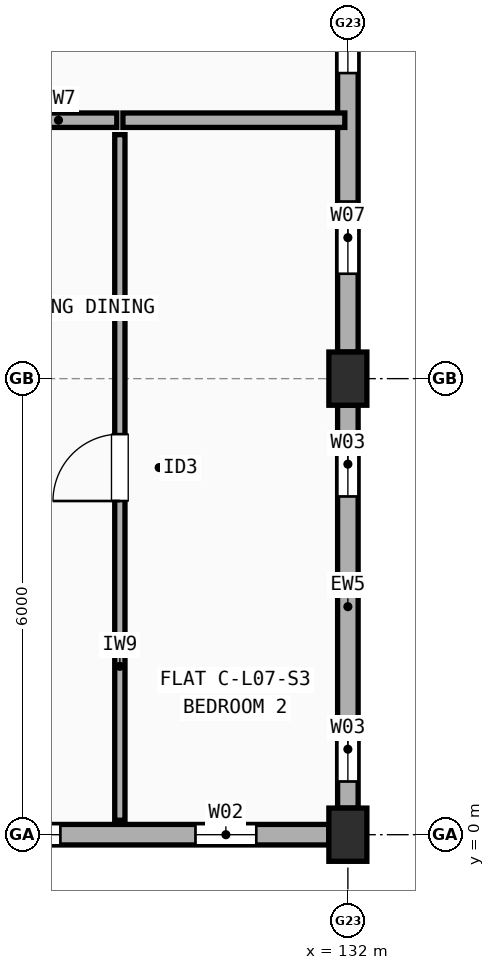
"""IFC4 building model, lengths in metres.
Left out: names, types, materials, properties, quantities, classifications, styles, units other than length and angle.
Written with IfcOpenShell. Run it as: python <this file> out.ifc"""

import sys

from ifc_helpers import new_model, si_unit, direction, frame, frame_2d, origin, origin_2d, place, context, subcontext, project, spatial, rectangle, extrude, element, fill, save


model = new_model("IFC4")
c1 = context("Model", 3, precision=1e-05, world=origin(), true_north=direction((0.0, 1.0)))
c2 = subcontext(c1, "Body", "Model", "MODEL_VIEW")
j1 = project(units=[si_unit("LENGTHUNIT", "METRE"), si_unit("PLANEANGLEUNIT", "RADIAN")], contexts=[c1])
p1 = place(None, origin())
s1 = spatial("IfcSite", under=j1, at=p1, CompositionType="ELEMENT")
p2 = place(p1, origin())
s2 = spatial("IfcBuilding", under=s1, at=p2, CompositionType="ELEMENT")
p3 = place(p2, frame((0.0, 0.0, 23.7)))
s3 = spatial("IfcBuildingStorey", under=s2, at=p3, CompositionType="ELEMENT", Elevation=23.7)
for number, where, z_axis, x_axis in (
    (1, (132.0, 0.0, 0.0), (0.0, 0.0, 1.0), (1.0, 0.0, 0.0)),
    (2, (132.0, 6.0, 0.0), (0.0, 0.0, 1.0), (1.0, 0.0, 0.0)),
):
    element("IfcColumn", number, at=place(p3, frame(where, z_axis=z_axis, x_axis=x_axis)), inside=s3, PredefinedType="COLUMN", context=c2, shape_type="SweptSolid", body=[
        extrude(rectangle(XDim=0.5, YDim=0.7, at=origin_2d()), origin(), (0.0, 0.0, 1.0), 2.975),
    ])
p4 = place(p3, frame((126.275, 0.0, 0.0), z_axis=(0.0, 0.0, 1.0), x_axis=(1.0, 0.0, 0.0)))
e3 = element("IfcWall", 3, at=p4, inside=s3, PredefinedType="STANDARD", context=c2, shape_type="SweptSolid", body=[
    extrude(rectangle(XDim=5.475, YDim=0.27, at=frame_2d((2.738, 0.0))), origin(), (0.0, 0.0, 1.0), 2.457),
])
p5 = place(p4, frame((0.742, 0.0, 0.9)))
e4 = element("IfcOpeningElement", 4, at=p5, cuts=e3, PredefinedType="OPENING", context=c2, shape_type="SweptSolid", body=[
    extrude(rectangle(XDim=1.2, YDim=1.35, at=frame_2d((0.6, 0.675))), frame((0.0, 0.145, 0.0), z_axis=(0.0, -1.0, 0.0), x_axis=(1.0, 0.0, 0.0)), (0.0, 0.0, 1.0), 0.29),
])
p6 = place(p4, frame((3.72, 0.0, 0.9)))
e5 = element("IfcOpeningElement", 5, at=p6, cuts=e3, PredefinedType="OPENING", context=c2, shape_type="SweptSolid", body=[
    extrude(rectangle(XDim=0.8, YDim=1.2, at=frame_2d((0.4, 0.6))), frame((0.0, 0.145, 0.0), z_axis=(0.0, -1.0, 0.0), x_axis=(1.0, 0.0, 0.0)), (0.0, 0.0, 1.0), 0.29),
])
p7 = place(p3, frame((132.0, 0.35, 0.0), z_axis=(0.0, 0.0, 1.0), x_axis=(0.0, 1.0, 0.0)))
e6 = element("IfcWall", 6, at=p7, inside=s3, PredefinedType="STANDARD", context=c2, shape_type="SweptSolid", body=[
    extrude(rectangle(XDim=5.3, YDim=0.27, at=frame_2d((2.65, 0.0))), origin(), (0.0, 0.0, 1.0), 2.457),
])
p8 = place(p7, frame((0.35, 0.0, 0.9)))
e7 = element("IfcOpeningElement", 7, at=p8, cuts=e6, PredefinedType="OPENING", context=c2, shape_type="SweptSolid", body=[
    extrude(rectangle(XDim=0.85, YDim=1.25, at=frame_2d((0.425, 0.625))), frame((0.0, 0.145, 0.0), z_axis=(0.0, -1.0, 0.0), x_axis=(1.0, 0.0, 0.0)), (0.0, 0.0, 1.0), 0.29),
])
p9 = place(p7, frame((4.1, 0.0, 0.9)))
e8 = element("IfcOpeningElement", 8, at=p9, cuts=e6, PredefinedType="OPENING", context=c2, shape_type="SweptSolid", body=[
    extrude(rectangle(XDim=0.85, YDim=1.25, at=frame_2d((0.425, 0.625))), frame((0.0, 0.145, 0.0), z_axis=(0.0, -1.0, 0.0), x_axis=(1.0, 0.0, 0.0)), (0.0, 0.0, 1.0), 0.29),
])
p10 = place(p3, frame((132.0, 6.35, 0.0), z_axis=(0.0, 0.0, 1.0), x_axis=(0.0, 1.0, 0.0)))
e9 = element("IfcWall", 9, at=p10, inside=s3, PredefinedType="STANDARD", context=c2, shape_type="SweptSolid", body=[
    extrude(rectangle(XDim=5.3, YDim=0.27, at=frame_2d((2.65, 0.0))), origin(), (0.0, 0.0, 1.0), 2.457),
])
p11 = place(p10, frame((1.03, 0.0, 0.9)))
e10 = element("IfcOpeningElement", 10, at=p11, cuts=e9, PredefinedType="OPENING", context=c2, shape_type="SweptSolid", body=[
    extrude(rectangle(XDim=0.95, YDim=1.35, at=frame_2d((0.475, 0.675))), frame((0.0, 0.145, 0.0), z_axis=(0.0, -1.0, 0.0), x_axis=(1.0, 0.0, 0.0)), (0.0, 0.0, 1.0), 0.29),
])
p12 = place(p10, frame((3.67, 0.0, 0.9)))
e11 = element("IfcOpeningElement", 11, at=p12, cuts=e9, PredefinedType="OPENING", context=c2, shape_type="SweptSolid", body=[
    extrude(rectangle(XDim=1.05, YDim=1.35, at=frame_2d((0.525, 0.675))), frame((0.0, 0.145, 0.0), z_axis=(0.0, -1.0, 0.0), x_axis=(1.0, 0.0, 0.0)), (0.0, 0.0, 1.0), 0.29),
])
p13 = place(p3, frame((124.54, 9.4, 0.0), z_axis=(0.0, 0.0, 1.0), x_axis=(1.0, 0.0, 0.0)))
e12 = element("IfcWall", 12, at=p13, inside=s3, PredefinedType="SOLIDWALL", context=c2, shape_type="SweptSolid", body=[
    extrude(rectangle(XDim=4.42, YDim=0.19, at=frame_2d((2.21, 0.0))), origin(), (0.0, 0.0, 1.0), 2.548),
])
p14 = place(p13, frame((1.685, 0.0, 0.0)))
e13 = element("IfcOpeningElement", 13, at=p14, cuts=e12, PredefinedType="OPENING", context=c2, shape_type="SweptSolid", body=[
    extrude(rectangle(XDim=1.05, YDim=2.15, at=frame_2d((0.525, 1.075))), frame((0.0, 0.105, 0.0), z_axis=(0.0, -1.0, 0.0), x_axis=(1.0, 0.0, 0.0)), (0.0, 0.0, 1.0), 0.21),
])
p15 = place(p3, frame((129.04, 9.4, 0.0), z_axis=(0.0, 0.0, 1.0), x_axis=(1.0, 0.0, 0.0)))
e14 = element("IfcWall", 14, at=p15, inside=s3, PredefinedType="SOLIDWALL", context=c2, shape_type="SweptSolid", body=[
    extrude(rectangle(XDim=2.92, YDim=0.19, at=frame_2d((1.46, 0.0))), origin(), (0.0, 0.0, 1.0), 2.457),
])
p16 = place(p3, frame((129.0, 0.19, 0.0), z_axis=(0.0, 0.0, 1.0), x_axis=(0.0, 1.0, 0.0)))
e15 = element("IfcWall", 15, at=p16, inside=s3, PredefinedType="PARTITIONING", context=c2, shape_type="SweptSolid", body=[
    extrude(rectangle(XDim=9.02, YDim=0.135, at=frame_2d((4.51, 0.0))), origin(), (0.0, 0.0, 1.0), 2.457),
])
p17 = place(p16, frame((4.2, 0.0, 0.0)))
e16 = element("IfcOpeningElement", 16, at=p17, cuts=e15, PredefinedType="OPENING", context=c2, shape_type="SweptSolid", body=[
    extrude(rectangle(XDim=0.88, YDim=2.1, at=frame_2d((0.44, 1.05))), frame((0.0, 0.077, 0.0), z_axis=(0.0, -1.0, 0.0), x_axis=(1.0, 0.0, 0.0)), (0.0, 0.0, 1.0), 0.155),
])
p18 = place(p5, origin())
e17 = element("IfcWindow", 17, at=p18, inside=s3, PartitioningType="SINGLE_PANEL", PredefinedType="WINDOW", context=c2, shape_type="SweptSolid", body=[
    extrude(rectangle(XDim=1.2, YDim=1.35, at=frame_2d((0.6, 0.675))), frame((0.0, 0.03, 0.0), z_axis=(0.0, -1.0, 0.0), x_axis=(1.0, 0.0, 0.0)), (0.0, 0.0, 1.0), 0.06),
])
fill(e4, e17)
p19 = place(p6, origin())
e18 = element("IfcWindow", 18, at=p19, inside=s3, PartitioningType="SINGLE_PANEL", PredefinedType="WINDOW", context=c2, shape_type="SweptSolid", body=[
    extrude(rectangle(XDim=0.8, YDim=1.2, at=frame_2d((0.4, 0.6))), frame((0.0, 0.03, 0.0), z_axis=(0.0, -1.0, 0.0), x_axis=(1.0, 0.0, 0.0)), (0.0, 0.0, 1.0), 0.06),
])
fill(e5, e18)
p20 = place(p8, origin())
e19 = element("IfcWindow", 19, at=p20, inside=s3, PartitioningType="SINGLE_PANEL", PredefinedType="WINDOW", context=c2, shape_type="SweptSolid", body=[
    extrude(rectangle(XDim=0.85, YDim=1.25, at=frame_2d((0.425, 0.625))), frame((0.0, 0.03, 0.0), z_axis=(0.0, -1.0, 0.0), x_axis=(1.0, 0.0, 0.0)), (0.0, 0.0, 1.0), 0.06),
])
fill(e7, e19)
p21 = place(p9, origin())
e20 = element("IfcWindow", 20, at=p21, inside=s3, PartitioningType="SINGLE_PANEL", PredefinedType="WINDOW", context=c2, shape_type="SweptSolid", body=[
    extrude(rectangle(XDim=0.85, YDim=1.25, at=frame_2d((0.425, 0.625))), frame((0.0, 0.03, 0.0), z_axis=(0.0, -1.0, 0.0), x_axis=(1.0, 0.0, 0.0)), (0.0, 0.0, 1.0), 0.06),
])
fill(e8, e20)
p22 = place(p11, origin())
e21 = element("IfcWindow", 21, at=p22, inside=s3, PartitioningType="SINGLE_PANEL", PredefinedType="WINDOW", context=c2, shape_type="SweptSolid", body=[
    extrude(rectangle(XDim=0.95, YDim=1.35, at=frame_2d((0.475, 0.675))), frame((0.0, 0.03, 0.0), z_axis=(0.0, -1.0, 0.0), x_axis=(1.0, 0.0, 0.0)), (0.0, 0.0, 1.0), 0.06),
])
fill(e10, e21)
p23 = place(p12, origin())
e22 = element("IfcWindow", 22, at=p23, inside=s3, PartitioningType="SINGLE_PANEL", PredefinedType="WINDOW", context=c2, shape_type="SweptSolid", body=[
    extrude(rectangle(XDim=1.05, YDim=1.35, at=frame_2d((0.525, 0.675))), frame((0.0, 0.03, 0.0), z_axis=(0.0, -1.0, 0.0), x_axis=(1.0, 0.0, 0.0)), (0.0, 0.0, 1.0), 0.06),
])
fill(e11, e22)
p24 = place(p17, origin())
e23 = element("IfcDoor", 23, at=p24, inside=s3, OperationType="SINGLE_SWING_LEFT", PredefinedType="DOOR", context=c2, shape_type="SweptSolid", body=[
    extrude(rectangle(XDim=0.88, YDim=2.1, at=frame_2d((0.44, 1.05))), frame((0.0, 0.025, 0.0), z_axis=(0.0, -1.0, 0.0), x_axis=(1.0, 0.0, 0.0)), (0.0, 0.0, 1.0), 0.05),
])
fill(e16, e23)
save(model, sys.argv[1])
